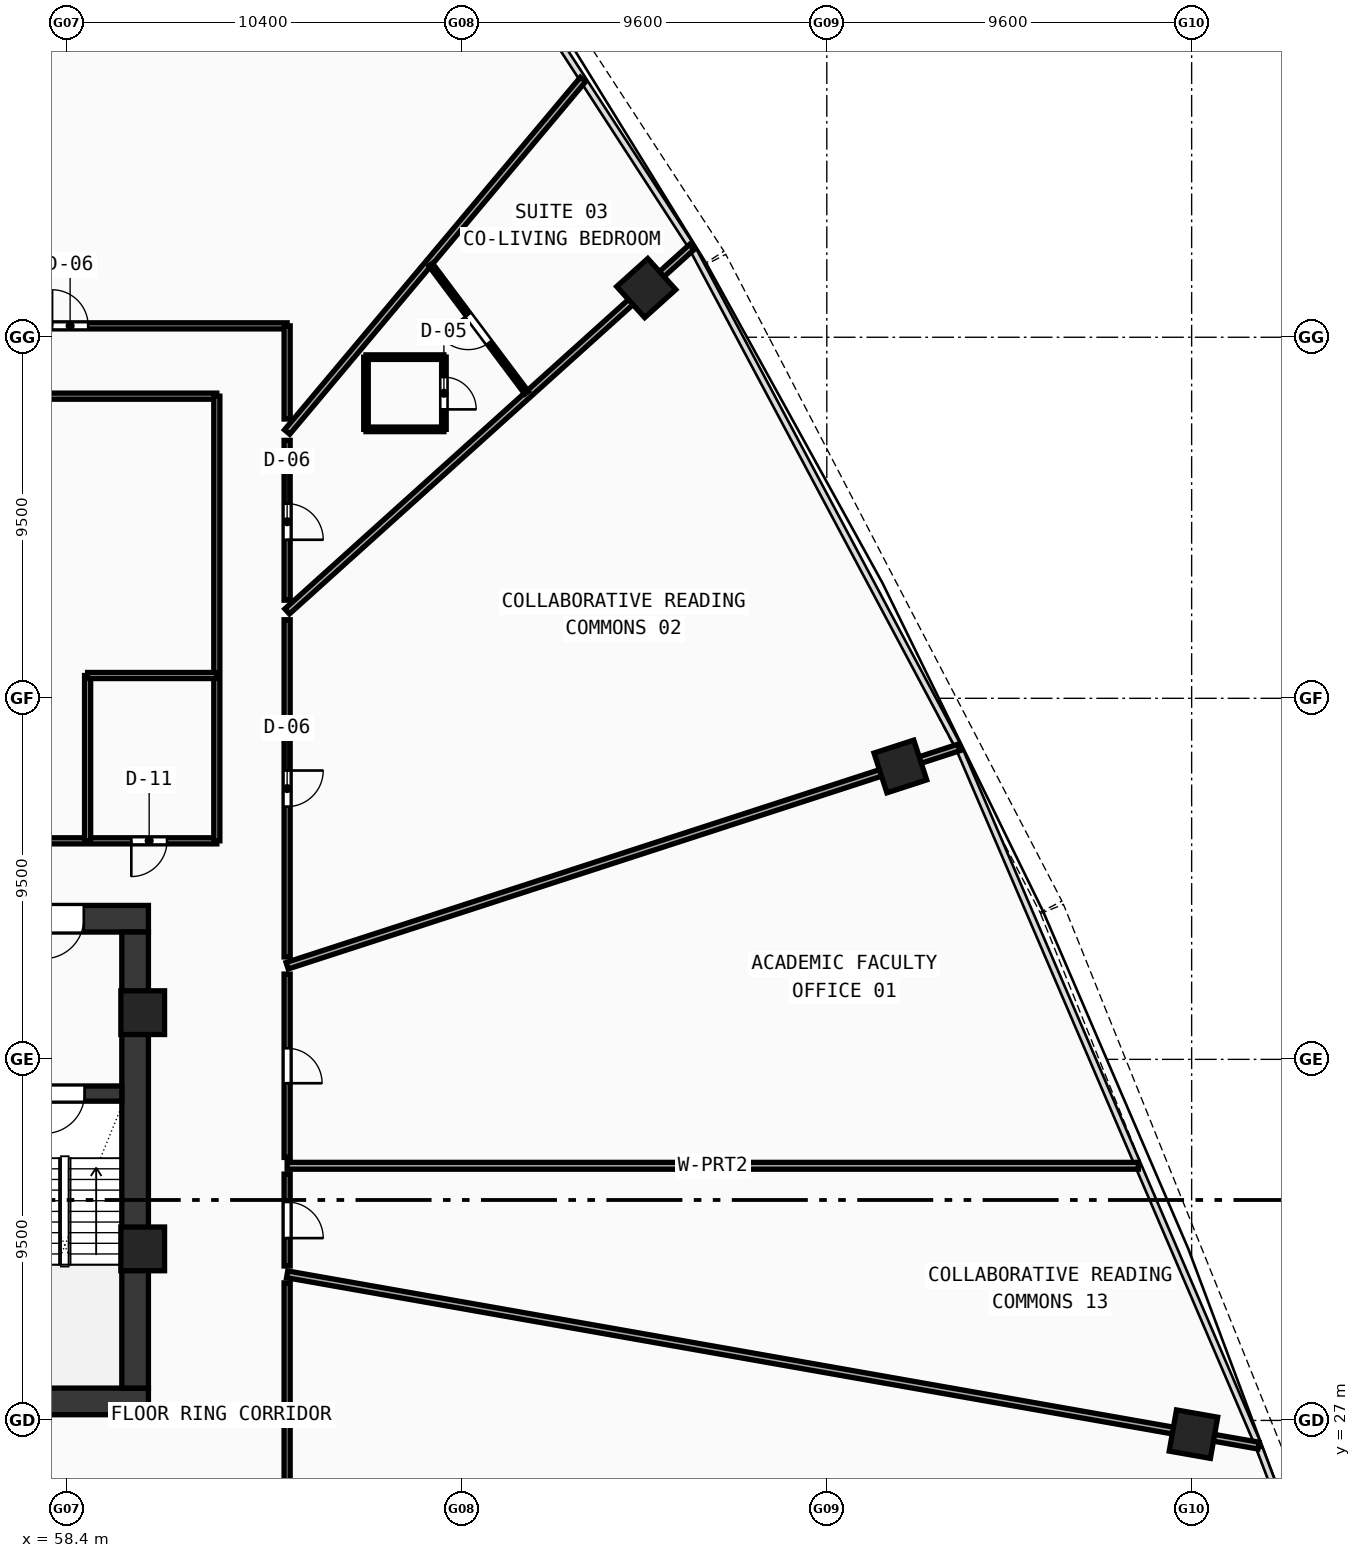
"""IFC4 building model, lengths in metres.
Left out: names, types, materials, properties, quantities, classifications, styles, units other than length and angle.
Written with IfcOpenShell. Run it as: python <this file> out.ifc"""

import sys

from ifc_helpers import new_model, si_unit, direction, frame, frame_2d, origin, origin_with_axes, origin_2d, place, context, subcontext, project, spatial, rectangle, hollow_rectangle, extrude, source, transform, mapped, element, fill, save


model = new_model("IFC4")
c1 = context("Model", 3, precision=1e-05, world=origin(), true_north=direction((0.0, 1.0)))
c2 = subcontext(c1, "Body", "Model", "MODEL_VIEW")
j1 = project(units=[si_unit("LENGTHUNIT", "METRE"), si_unit("PLANEANGLEUNIT", "RADIAN")], contexts=[c1])
p1 = place(None, origin())
s1 = spatial("IfcSite", under=j1, at=p1, CompositionType="ELEMENT")
p2 = place(p1, origin())
s2 = spatial("IfcBuilding", under=s1, at=p2, CompositionType="ELEMENT")
p3 = place(p2, frame((0.0, 0.0, 44.92)))
s3 = spatial("IfcBuildingStorey", under=s2, at=p3, CompositionType="ELEMENT", Elevation=44.92)
p4 = place(p3, frame((35.45, 27.5, 0.0), z_axis=(0.0, 0.0, 1.0), x_axis=(1.0, 0.0, 0.0)))
e1 = element("IfcWall", 1, at=p4, inside=s3, PredefinedType="SHEAR", context=c2, shape_type="SweptSolid", body=[
    extrude(rectangle(XDim=25.1, YDim=0.7, at=frame_2d((12.55, 0.0))), origin(), (0.0, 0.0, 1.0), 3.37),
])
p5 = place(p3, frame((49.2, 40.2, 0.0), z_axis=(0.0, 0.0, 1.0), x_axis=(1.0, 0.0, 0.0)))
e2 = element("IfcWall", 2, at=p5, inside=s3, PredefinedType="SHEAR", context=c2, shape_type="SweptSolid", body=[
    extrude(rectangle(XDim=11.35, YDim=0.7, at=frame_2d((5.675, 0.0))), origin(), (0.0, 0.0, 1.0), 3.37),
])
p6 = place(p5, frame((8.6, 0.0, 0.0)))
e3 = element("IfcOpeningElement", 3, at=p6, cuts=e2, PredefinedType="OPENING", context=c2, shape_type="SweptSolid", body=[
    extrude(rectangle(XDim=1.05, YDim=2.1, at=frame_2d((0.525, 1.05))), frame((0.0, 0.36, 0.0), z_axis=(0.0, -1.0, 0.0), x_axis=(1.0, 0.0, 0.0)), (0.0, 0.0, 1.0), 0.72),
])
p7 = place(p3, frame((60.2, 27.85, 0.0), z_axis=(0.0, 0.0, 1.0), x_axis=(0.0, 1.0, 0.0)))
e4 = element("IfcWall", 4, at=p7, inside=s3, PredefinedType="SHEAR", context=c2, shape_type="SweptSolid", body=[
    extrude(rectangle(XDim=12.0, YDim=0.7, at=frame_2d((6.0, 0.0))), origin(), (0.0, 0.0, 1.0), 3.37),
])
p8 = place(p3, frame((56.8, 35.6, 0.0), z_axis=(0.0, 0.0, 1.0), x_axis=(1.0, 0.0, 0.0)))
e5 = element("IfcWall", 5, at=p8, inside=s3, PredefinedType="SHEAR", context=c2, shape_type="SweptSolid", body=[
    extrude(rectangle(XDim=3.05, YDim=0.4, at=frame_2d((1.525, 0.0))), origin(), (0.0, 0.0, 1.0), 3.37),
])
p9 = place(p8, frame((1.02, 0.0, 0.0)))
e6 = element("IfcOpeningElement", 6, at=p9, cuts=e5, PredefinedType="OPENING", context=c2, shape_type="SweptSolid", body=[
    extrude(rectangle(XDim=1.05, YDim=2.1, at=frame_2d((0.525, 1.05))), frame((0.0, 0.21, 0.0), z_axis=(0.0, -1.0, 0.0), x_axis=(1.0, 0.0, 0.0)), (0.0, 0.0, 1.0), 0.42),
])
m1 = source(origin(), c2, "Body", "SweptSolid", [
    extrude(hollow_rectangle(XDim=1.15, YDim=1.15, WallThickness=0.048, at=origin_2d()), origin(), (0.0, 0.0, 1.0), 3.63),
])
for number, where, z_axis, x_axis in (
    (7, (60.4, 31.513, -0.26), (0.0, 0.0, 1.0), (1.0, 0.0, 0.0)),
    (8, (60.4, 37.729, -0.26), (0.0, 0.0, 1.0), (1.0, 0.0, 0.0)),
):
    element("IfcColumn", number, at=place(p3, frame(where, z_axis=z_axis, x_axis=x_axis)), inside=s3, PredefinedType="COLUMN", context=c2, shape_type="MappedRepresentation", body=[
        mapped(m1, transform((0.0, 0.0, 0.0), scale=1.0)),
    ])
m2 = source(origin(), c2, "Body", "SweptSolid", [
    extrude(hollow_rectangle(XDim=1.1, YDim=1.1, WallThickness=0.045, at=origin_2d()), origin(), (0.0, 0.0, 1.0), 3.63),
])
for number, where, z_axis, x_axis in (
    (9, (88.048, 26.638, -0.26), (0.0, 0.0, 1.0), (0.174, 0.985, 0.0)),
    (10, (80.335, 44.206, -0.26), (0.0, 0.0, 1.0), (-0.309, 0.951, 0.0)),
    (11, (73.649, 56.794, -0.26), (0.0, 0.0, 1.0), (-0.669, 0.743, 0.0)),
):
    element("IfcColumn", number, at=place(p3, frame(where, z_axis=z_axis, x_axis=x_axis)), inside=s3, PredefinedType="COLUMN", context=c2, shape_type="MappedRepresentation", body=[
        mapped(m2, transform((0.0, 0.0, 0.0), scale=1.0)),
    ])
p10 = place(p3, frame((45.92, 42.25, 0.0), z_axis=(0.0, 0.0, 1.0), x_axis=(1.0, 0.0, 0.0)))
e12 = element("IfcWall", 12, at=p10, inside=s3, PredefinedType="PARTITIONING", context=c2, shape_type="SweptSolid", body=[
    extrude(rectangle(XDim=16.43, YDim=0.16, at=frame_2d((8.215, 0.0))), origin(), (0.0, 0.0, 1.0), 2.67),
])
p11 = place(p10, frame((2.1, 0.0, 0.0)))
e13 = element("IfcOpeningElement", 13, at=p11, cuts=e12, PredefinedType="OPENING", context=c2, shape_type="SweptSolid", body=[
    extrude(rectangle(XDim=0.92, YDim=2.1, at=frame_2d((0.46, 1.05))), frame((0.0, 0.09, 0.0), z_axis=(0.0, -1.0, 0.0), x_axis=(1.0, 0.0, 0.0)), (0.0, 0.0, 1.0), 0.18),
])
p12 = place(p10, frame((14.18, 0.0, 0.0)))
e14 = element("IfcOpeningElement", 14, at=p12, cuts=e12, PredefinedType="OPENING", context=c2, shape_type="SweptSolid", body=[
    extrude(rectangle(XDim=0.94, YDim=2.1, at=frame_2d((0.47, 1.05))), frame((0.0, 0.09, 0.0), z_axis=(0.0, -1.0, 0.0), x_axis=(1.0, 0.0, 0.0)), (0.0, 0.0, 1.0), 0.18),
])
p13 = place(p3, frame((45.92, 53.95, 0.0), z_axis=(0.0, 0.0, 1.0), x_axis=(1.0, 0.0, 0.0)))
e15 = element("IfcWall", 15, at=p13, inside=s3, PredefinedType="PARTITIONING", context=c2, shape_type="SweptSolid", body=[
    extrude(rectangle(XDim=16.43, YDim=0.16, at=frame_2d((8.215, 0.0))), origin(), (0.0, 0.0, 1.0), 2.67),
])
p14 = place(p3, frame((62.35, 42.25, 0.0), z_axis=(0.0, 0.0, 1.0), x_axis=(0.0, 1.0, 0.0)))
e16 = element("IfcWall", 16, at=p14, inside=s3, PredefinedType="PARTITIONING", context=c2, shape_type="SweptSolid", body=[
    extrude(rectangle(XDim=11.7, YDim=0.16, at=frame_2d((5.85, 0.0))), origin(), (0.0, 0.0, 1.0), 2.67),
])
p15 = place(p3, frame((58.95, 42.25, 0.0), z_axis=(0.0, 0.0, 1.0), x_axis=(0.0, 1.0, 0.0)))
e17 = element("IfcWall", 17, at=p15, inside=s3, PredefinedType="PARTITIONING", context=c2, shape_type="SweptSolid", body=[
    extrude(rectangle(XDim=4.35, YDim=0.16, at=frame_2d((2.175, 0.0))), origin(), (0.0, 0.0, 1.0), 2.67),
])
p16 = place(p3, frame((58.95, 46.6, 0.0), z_axis=(0.0, 0.0, 1.0), x_axis=(1.0, 0.0, 0.0)))
e18 = element("IfcWall", 18, at=p16, inside=s3, PredefinedType="PARTITIONING", context=c2, shape_type="SweptSolid", body=[
    extrude(rectangle(XDim=3.4, YDim=0.16, at=frame_2d((1.7, 0.0))), origin(), (0.0, 0.0, 1.0), 2.67),
])
p17 = place(p3, frame((64.2, 33.7, 0.0), z_axis=(0.0, 0.0, 1.0), x_axis=(1.0, 0.0, 0.0)))
e19 = element("IfcWall", 19, at=p17, inside=s3, PredefinedType="PARTITIONING", context=c2, shape_type="SweptSolid", body=[
    extrude(rectangle(XDim=22.398, YDim=0.18, at=frame_2d((11.199, 0.0))), origin(), (0.0, 0.0, 1.0), 2.67),
])
p18 = place(p3, frame((64.2, 38.964, 0.0), z_axis=(0.0, 0.0, 1.0), x_axis=(0.951055212532, 0.309021006915, 0.0)))
e20 = element("IfcWall", 20, at=p18, inside=s3, PredefinedType="PARTITIONING", context=c2, shape_type="SweptSolid", body=[
    extrude(rectangle(XDim=18.581, YDim=0.18, at=frame_2d((9.291, 0.0))), origin(), (0.0, 0.0, 1.0), 2.67),
])
p19 = place(p3, frame((64.2, 48.287, 0.0), z_axis=(0.0, 0.0, 1.0), x_axis=(0.743156867614, 0.669117231969, 0.0)))
e21 = element("IfcWall", 21, at=p19, inside=s3, PredefinedType="PARTITIONING", context=c2, shape_type="SweptSolid", body=[
    extrude(rectangle(XDim=14.327, YDim=0.18, at=frame_2d((7.164, 0.0))), origin(), (0.0, 0.0, 1.0), 2.67),
])
p20 = place(p3, frame((64.2, 53.006, 0.0), z_axis=(0.0, 0.0, 1.0), x_axis=(0.642786334534, 0.766045513098, 0.0)))
e22 = element("IfcWall", 22, at=p20, inside=s3, PredefinedType="PARTITIONING", context=c2, shape_type="SweptSolid", body=[
    extrude(rectangle(XDim=12.11, YDim=0.18, at=frame_2d((6.055, 0.0))), origin(), (0.0, 0.0, 1.0), 2.67),
])
p21 = place(p3, frame((64.2, 30.844, 0.0), z_axis=(0.0, 0.0, 1.0), x_axis=(0.984807792045, -0.173647956302, 0.0)))
e23 = element("IfcWall", 23, at=p21, inside=s3, PredefinedType="PARTITIONING", context=c2, shape_type="SweptSolid", body=[
    extrude(rectangle(XDim=25.954, YDim=0.18, at=frame_2d((12.977, 0.0))), origin(), (0.0, 0.0, 1.0), 2.67),
])
p22 = place(p3, frame((52.391, 55.8, 0.0), z_axis=(0.0, 0.0, 1.0), x_axis=(1.0, 0.0, 0.0)))
e24 = element("IfcWall", 24, at=p22, inside=s3, PredefinedType="PARTITIONING", context=c2, shape_type="SweptSolid", body=[
    extrude(rectangle(XDim=11.809, YDim=0.16, at=frame_2d((5.904, 0.0))), origin(), (0.0, 0.0, 1.0), 2.67),
])
p23 = place(p22, frame((5.624, 0.0, 0.0)))
e25 = element("IfcOpeningElement", 25, at=p23, cuts=e24, PredefinedType="OPENING", context=c2, shape_type="SweptSolid", body=[
    extrude(rectangle(XDim=0.95, YDim=2.1, at=frame_2d((0.475, 1.05))), frame((0.0, 0.09, 0.0), z_axis=(0.0, -1.0, 0.0), x_axis=(1.0, 0.0, 0.0)), (0.0, 0.0, 1.0), 0.18),
])
p24 = place(p3, frame((64.2, 55.8, 0.0), z_axis=(0.0, 0.0, 1.0), x_axis=(0.0, -1.0, 0.0)))
e26 = element("IfcWall", 26, at=p24, inside=s3, PredefinedType="PARTITIONING", context=c2, shape_type="SweptSolid", body=[
    extrude(rectangle(XDim=2.451, YDim=0.16, at=frame_2d((1.226, 0.0))), origin(), (0.0, 0.0, 1.0), 2.97),
])
p25 = place(p3, frame((64.2, 52.787, 0.0), z_axis=(0.0, 0.0, 1.0), x_axis=(0.0, -1.0, 0.0)))
e27 = element("IfcWall", 27, at=p25, inside=s3, PredefinedType="PARTITIONING", context=c2, shape_type="SweptSolid", body=[
    extrude(rectangle(XDim=4.204, YDim=0.16, at=frame_2d((2.102, 0.0))), origin(), (0.0, 0.0, 1.0), 3.37),
])
p26 = place(p25, frame((1.665, 0.0, 0.0)))
e28 = element("IfcOpeningElement", 28, at=p26, cuts=e27, PredefinedType="OPENING", context=c2, shape_type="SweptSolid", body=[
    extrude(rectangle(XDim=0.95, YDim=2.1, at=frame_2d((0.475, 1.05))), frame((0.0, 0.09, 0.0), z_axis=(0.0, -1.0, 0.0), x_axis=(1.0, 0.0, 0.0)), (0.0, 0.0, 1.0), 0.18),
])
p27 = place(p3, frame((64.2, 48.067, 0.0), z_axis=(0.0, 0.0, 1.0), x_axis=(0.0, -1.0, 0.0)))
e29 = element("IfcWall", 29, at=p27, inside=s3, PredefinedType="PARTITIONING", context=c2, shape_type="SweptSolid", body=[
    extrude(rectangle(XDim=8.872, YDim=0.16, at=frame_2d((4.436, 0.0))), origin(), (0.0, 0.0, 1.0), 2.67),
])
p28 = place(p27, frame((3.967, 0.0, 0.0)))
e30 = element("IfcOpeningElement", 30, at=p28, cuts=e29, PredefinedType="OPENING", context=c2, shape_type="SweptSolid", body=[
    extrude(rectangle(XDim=0.95, YDim=2.1, at=frame_2d((0.475, 1.05))), frame((0.0, 0.09, 0.0), z_axis=(0.0, -1.0, 0.0), x_axis=(1.0, 0.0, 0.0)), (0.0, 0.0, 1.0), 0.18),
])
p29 = place(p3, frame((64.2, 38.744, 0.0), z_axis=(0.0, 0.0, 1.0), x_axis=(0.0, -1.0, 0.0)))
e31 = element("IfcWall", 31, at=p29, inside=s3, PredefinedType="PARTITIONING", context=c2, shape_type="SweptSolid", body=[
    extrude(rectangle(XDim=4.824, YDim=0.16, at=frame_2d((2.412, 0.0))), origin(), (0.0, 0.0, 1.0), 3.37),
])
p30 = place(p29, frame((1.952, 0.0, 0.0)))
e32 = element("IfcOpeningElement", 32, at=p30, cuts=e31, PredefinedType="OPENING", context=c2, shape_type="SweptSolid", body=[
    extrude(rectangle(XDim=0.92, YDim=2.1, at=frame_2d((0.46, 1.05))), frame((0.0, 0.09, 0.0), z_axis=(0.0, -1.0, 0.0), x_axis=(1.0, 0.0, 0.0)), (0.0, 0.0, 1.0), 0.18),
])
p31 = place(p3, frame((64.2, 33.48, 0.0), z_axis=(0.0, 0.0, 1.0), x_axis=(0.0, -1.0, 0.0)))
e33 = element("IfcWall", 33, at=p31, inside=s3, PredefinedType="PARTITIONING", context=c2, shape_type="SweptSolid", body=[
    extrude(rectangle(XDim=2.417, YDim=0.16, at=frame_2d((1.208, 0.0))), origin(), (0.0, 0.0, 1.0), 3.37),
])
p32 = place(p31, frame((0.733, 0.0, 0.0)))
e34 = element("IfcOpeningElement", 34, at=p32, cuts=e33, PredefinedType="OPENING", context=c2, shape_type="SweptSolid", body=[
    extrude(rectangle(XDim=0.95, YDim=2.1, at=frame_2d((0.475, 1.05))), frame((0.0, 0.09, 0.0), z_axis=(0.0, -1.0, 0.0), x_axis=(1.0, 0.0, 0.0)), (0.0, 0.0, 1.0), 0.18),
])
p33 = place(p3, frame((64.2, 30.62, 0.0), z_axis=(0.0, 0.0, 1.0), x_axis=(0.0, -1.0, 0.0)))
e35 = element("IfcWall", 35, at=p33, inside=s3, PredefinedType="PARTITIONING", context=c2, shape_type="SweptSolid", body=[
    extrude(rectangle(XDim=5.82, YDim=0.16, at=frame_2d((2.91, 0.0))), origin(), (0.0, 0.0, 1.0), 2.97),
])
p34 = place(p3, frame((66.275, 53.077, 0.0), z_axis=(0.0, 0.0, 1.0), x_axis=(1.0, 0.0, 0.0)))
e36 = element("IfcWall", 36, at=p34, inside=s3, PredefinedType="PARTITIONING", context=c2, shape_type="SweptSolid", body=[
    extrude(rectangle(XDim=2.05, YDim=0.12, at=frame_2d((1.025, 0.0))), origin(), (0.0, 0.0, 1.0), 2.97),
])
p35 = place(p3, frame((68.325, 53.077, 0.0), z_axis=(0.0, 0.0, 1.0), x_axis=(0.0, 1.0, 0.0)))
e37 = element("IfcWall", 37, at=p35, inside=s3, PredefinedType="PARTITIONING", context=c2, shape_type="SweptSolid", body=[
    extrude(rectangle(XDim=1.9, YDim=0.12, at=frame_2d((0.95, 0.0))), origin(), (0.0, 0.0, 1.0), 3.37),
])
p36 = place(p35, frame((0.525, 0.0, 0.0)))
e38 = element("IfcOpeningElement", 38, at=p36, cuts=e37, PredefinedType="OPENING", context=c2, shape_type="SweptSolid", body=[
    extrude(rectangle(XDim=0.85, YDim=2.1, at=frame_2d((0.425, 1.05))), frame((0.0, 0.07, 0.0), z_axis=(0.0, -1.0, 0.0), x_axis=(1.0, 0.0, 0.0)), (0.0, 0.0, 1.0), 0.14),
])
p37 = place(p3, frame((68.325, 54.977, 0.0), z_axis=(0.0, 0.0, 1.0), x_axis=(-1.0, 0.0, 0.0)))
e39 = element("IfcWall", 39, at=p37, inside=s3, PredefinedType="PARTITIONING", context=c2, shape_type="SweptSolid", body=[
    extrude(rectangle(XDim=2.05, YDim=0.12, at=frame_2d((1.025, 0.0))), origin(), (0.0, 0.0, 1.0), 3.37),
])
p38 = place(p3, frame((66.275, 54.977, 0.0), z_axis=(0.0, 0.0, 1.0), x_axis=(0.0, -1.0, 0.0)))
e40 = element("IfcWall", 40, at=p38, inside=s3, PredefinedType="PARTITIONING", context=c2, shape_type="SweptSolid", body=[
    extrude(rectangle(XDim=1.9, YDim=0.12, at=frame_2d((0.95, 0.0))), origin(), (0.0, 0.0, 1.0), 2.97),
])
p39 = place(p3, frame((70.501, 54.04, 0.0), z_axis=(0.0, 0.0, 1.0), x_axis=(-0.599443526822, 0.800417052636, 0.0)))
e41 = element("IfcWall", 41, at=p39, inside=s3, PredefinedType="PARTITIONING", context=c2, shape_type="SweptSolid", body=[
    extrude(rectangle(XDim=4.213, YDim=0.12, at=frame_2d((2.106, 0.0))), origin(), (0.0, 0.0, 1.0), 2.67),
])
p40 = place(p39, frame((1.646, 0.0, 0.0)))
e42 = element("IfcOpeningElement", 42, at=p40, cuts=e41, PredefinedType="OPENING", context=c2, shape_type="SweptSolid", body=[
    extrude(rectangle(XDim=0.92, YDim=2.1, at=frame_2d((0.46, 1.05))), frame((0.0, 0.07, 0.0), z_axis=(0.0, -1.0, 0.0), x_axis=(1.0, 0.0, 0.0)), (0.0, 0.0, 1.0), 0.14),
])
m3 = source(origin(), c2, "Body", "SweptSolid", [
    extrude(rectangle(XDim=1.05, YDim=2.1, at=frame_2d((0.525, 1.05))), frame((0.0, 0.025, 0.0), z_axis=(0.0, -1.0, 0.0), x_axis=(1.0, 0.0, 0.0)), (0.0, 0.0, 1.0), 0.05),
])
p41 = place(p9, frame((1.05, 0.0, 0.0), z_axis=(0.0, 0.0, 1.0), x_axis=(-1.0, 0.0, 0.0)))
e43 = element("IfcDoor", 43, at=p41, inside=s3, OperationType="SINGLE_SWING_RIGHT", PredefinedType="DOOR", context=c2, shape_type="MappedRepresentation", body=[
    mapped(m3, transform((0.0, 0.0, 0.0), scale=1.0)),
])
fill(e6, e43)
p42 = place(p6, frame((1.05, 0.0, 0.0), z_axis=(0.0, 0.0, 1.0), x_axis=(-1.0, 0.0, 0.0)))
e44 = element("IfcDoor", 44, at=p42, inside=s3, OperationType="SINGLE_SWING_RIGHT", PredefinedType="DOOR", context=c2, shape_type="MappedRepresentation", body=[
    mapped(m3, transform((0.0, 0.0, 0.0), scale=1.0)),
])
fill(e3, e44)
m4 = source(origin(), c2, "Body", "SweptSolid", [
    extrude(rectangle(XDim=0.94, YDim=2.1, at=frame_2d((0.47, 1.05))), frame((0.0, 0.025, 0.0), z_axis=(0.0, -1.0, 0.0), x_axis=(1.0, 0.0, 0.0)), (0.0, 0.0, 1.0), 0.05),
])
p43 = place(p12, frame((0.94, 0.0, 0.0), z_axis=(0.0, 0.0, 1.0), x_axis=(-1.0, 0.0, 0.0)))
e45 = element("IfcDoor", 45, at=p43, inside=s3, OperationType="SINGLE_SWING_RIGHT", PredefinedType="DOOR", context=c2, shape_type="MappedRepresentation", body=[
    mapped(m4, transform((0.0, 0.0, 0.0), scale=1.0)),
])
fill(e14, e45)
m5 = source(origin(), c2, "Body", "SweptSolid", [
    extrude(rectangle(XDim=0.92, YDim=2.1, at=frame_2d((0.46, 1.05))), frame((0.0, 0.025, 0.0), z_axis=(0.0, -1.0, 0.0), x_axis=(1.0, 0.0, 0.0)), (0.0, 0.0, 1.0), 0.05),
])
p44 = place(p30, origin_with_axes())
e46 = element("IfcDoor", 46, at=p44, inside=s3, OperationType="SINGLE_SWING_RIGHT", PredefinedType="DOOR", context=c2, shape_type="MappedRepresentation", body=[
    mapped(m5, transform((0.0, 0.0, 0.0), scale=1.0)),
])
fill(e32, e46)
m6 = source(origin(), c2, "Body", "SweptSolid", [
    extrude(rectangle(XDim=0.95, YDim=2.1, at=frame_2d((0.475, 1.05))), frame((0.0, 0.025, 0.0), z_axis=(0.0, -1.0, 0.0), x_axis=(1.0, 0.0, 0.0)), (0.0, 0.0, 1.0), 0.05),
])
p45 = place(p28, origin_with_axes())
e47 = element("IfcDoor", 47, at=p45, inside=s3, OperationType="SINGLE_SWING_LEFT", PredefinedType="DOOR", context=c2, shape_type="MappedRepresentation", body=[
    mapped(m6, transform((0.0, 0.0, 0.0), scale=1.0)),
])
fill(e30, e47)
p46 = place(p26, origin_with_axes())
e48 = element("IfcDoor", 48, at=p46, inside=s3, OperationType="SINGLE_SWING_RIGHT", PredefinedType="DOOR", context=c2, shape_type="MappedRepresentation", body=[
    mapped(m6, transform((0.0, 0.0, 0.0), scale=1.0)),
])
fill(e28, e48)
m7 = source(origin(), c2, "Body", "SweptSolid", [
    extrude(rectangle(XDim=0.85, YDim=2.1, at=frame_2d((0.425, 1.05))), frame((0.0, 0.025, 0.0), z_axis=(0.0, -1.0, 0.0), x_axis=(1.0, 0.0, 0.0)), (0.0, 0.0, 1.0), 0.05),
])
p47 = place(p36, frame((0.85, 0.0, 0.0), z_axis=(0.0, 0.0, 1.0), x_axis=(-1.0, 0.0, 0.0)))
e49 = element("IfcDoor", 49, at=p47, inside=s3, OperationType="SINGLE_SWING_RIGHT", PredefinedType="DOOR", context=c2, shape_type="MappedRepresentation", body=[
    mapped(m7, transform((0.0, 0.0, 0.0), scale=1.0)),
])
fill(e38, e49)
p48 = place(p40, origin_with_axes())
e50 = element("IfcDoor", 50, at=p48, inside=s3, OperationType="SINGLE_SWING_RIGHT", PredefinedType="DOOR", context=c2, shape_type="MappedRepresentation", body=[
    mapped(m5, transform((0.0, 0.0, 0.0), scale=1.0)),
])
fill(e42, e50)
p49 = place(p23, origin_with_axes())
e51 = element("IfcDoor", 51, at=p49, inside=s3, OperationType="SINGLE_SWING_LEFT", PredefinedType="DOOR", context=c2, shape_type="MappedRepresentation", body=[
    mapped(m6, transform((0.0, 0.0, 0.0), scale=1.0)),
])
fill(e25, e51)
p50 = place(p32, origin_with_axes())
e52 = element("IfcDoor", 52, at=p50, inside=s3, OperationType="SINGLE_SWING_RIGHT", PredefinedType="DOOR", context=c2, shape_type="MappedRepresentation", body=[
    mapped(m6, transform((0.0, 0.0, 0.0), scale=1.0)),
])
fill(e34, e52)
save(model, sys.argv[1])
